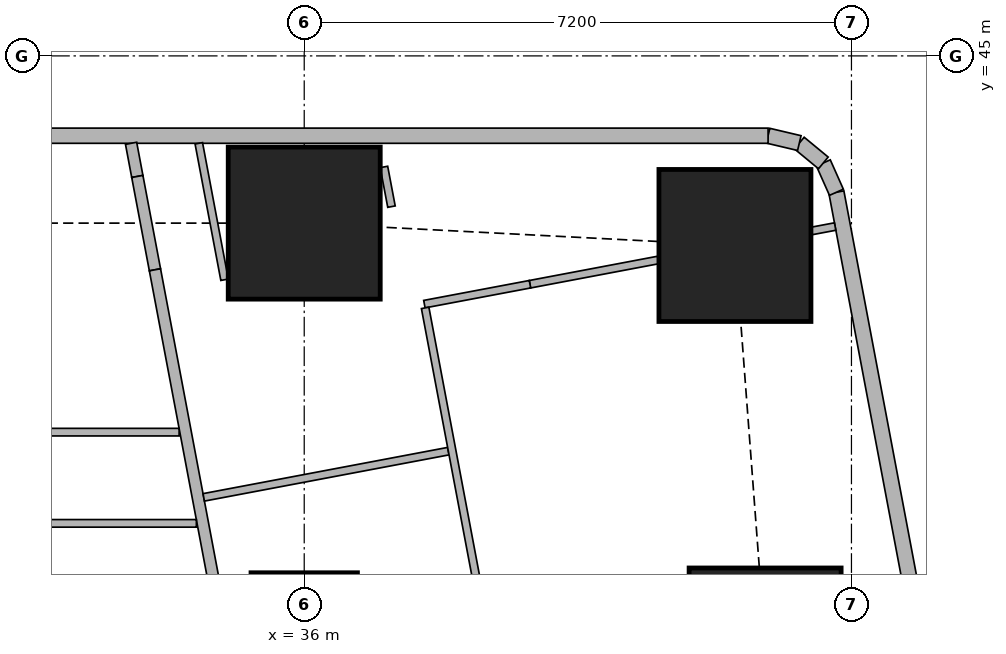
"""IFC4 building model, lengths in metres.
Left out: names, types, materials, properties, quantities, classifications, styles, units other than length and angle.
Written with IfcOpenShell. Run it as: python <this file> out.ifc"""

import sys

from ifc_helpers import new_model, si_unit, direction, frame, frame_2d, origin, origin_2d, place, context, subcontext, project, spatial, rectangle, extrude, element, fill, save


model = new_model("IFC4")
c1 = context("Model", 3, precision=1e-05, world=origin(), true_north=direction((0.0, 1.0)))
c2 = subcontext(c1, "Body", "Model", "MODEL_VIEW")
j1 = project(units=[si_unit("LENGTHUNIT", "METRE"), si_unit("PLANEANGLEUNIT", "RADIAN")], contexts=[c1])
p1 = place(None, origin())
s1 = spatial("IfcSite", under=j1, at=p1, CompositionType="ELEMENT")
p2 = place(p1, origin())
s2 = spatial("IfcBuilding", under=s1, at=p2, CompositionType="ELEMENT")
p3 = place(p2, frame((0.0, 0.0, 285.35)))
s3 = spatial("IfcBuildingStorey", under=s2, at=p3, CompositionType="ELEMENT", Elevation=285.35)
p4 = place(p3, frame((36.0, 37.5, 0.0), z_axis=(0.0, 0.0, 1.0), x_axis=(1.0, 0.0, 0.0)))
e1 = element("IfcColumn", 1, at=p4, inside=s3, PredefinedType="COLUMN", context=c2, shape_type="SweptSolid", body=[
    extrude(rectangle(XDim=1.4, YDim=1.4, at=origin_2d()), origin(), (0.0, 0.0, 1.0), 3.75),
])
for number, where, z_axis, x_axis in (
    (2, (42.064, 37.263, 0.0), (0.0, 0.0, 1.0), (1.0, 0.0, 0.0)),
    (3, (36.0, 42.8, 0.0), (0.0, 0.0, 1.0), (1.0, 0.0, 0.0)),
    (4, (41.667, 42.506, 0.0), (0.0, 0.0, 1.0), (1.0, 0.0, 0.0)),
):
    element("IfcColumn", number, at=place(p3, frame(where, z_axis=z_axis, x_axis=x_axis)), inside=s3, PredefinedType="COLUMN", context=c2, shape_type="SweptSolid", body=[
        extrude(rectangle(XDim=2.0, YDim=2.0, at=origin_2d()), origin(), (0.0, 0.0, 1.0), 3.75),
    ])
p5 = place(p3, frame((49.684, 7.832, 0.0), z_axis=(0.0, 0.0, 1.0), x_axis=(-0.185616669694, 0.982622232565, 0.0)))
e5 = element("IfcWall", 5, at=p5, inside=s3, PredefinedType="SOLIDWALL", context=c2, shape_type="SweptSolid", body=[
    extrude(rectangle(XDim=36.0, YDim=0.2, at=frame_2d((18.0, 0.0))), origin(), (0.0, 0.0, 1.0), 3.5),
])
p6 = place(p5, frame((2.518, 0.0, 0.9)))
e6 = element("IfcOpeningElement", 6, at=p6, cuts=e5, PredefinedType="OPENING", context=c2, shape_type="SweptSolid", body=[
    extrude(rectangle(XDim=2.4, YDim=1.5, at=frame_2d((1.2, 0.75))), frame((0.0, 0.11, 0.0), z_axis=(0.0, -1.0, 0.0), x_axis=(1.0, 0.0, 0.0)), (0.0, 0.0, 1.0), 0.22),
])
p7 = place(p5, frame((8.444, 0.0, 0.9)))
e7 = element("IfcOpeningElement", 7, at=p7, cuts=e5, PredefinedType="OPENING", context=c2, shape_type="SweptSolid", body=[
    extrude(rectangle(XDim=1.8, YDim=1.5, at=frame_2d((0.9, 0.75))), frame((0.0, 0.11, 0.0), z_axis=(0.0, -1.0, 0.0), x_axis=(1.0, 0.0, 0.0)), (0.0, 0.0, 1.0), 0.22),
])
p8 = place(p5, frame((12.261, 0.0, 0.9)))
e8 = element("IfcOpeningElement", 8, at=p8, cuts=e5, PredefinedType="OPENING", context=c2, shape_type="SweptSolid", body=[
    extrude(rectangle(XDim=1.8, YDim=1.5, at=frame_2d((0.9, 0.75))), frame((0.0, 0.11, 0.0), z_axis=(0.0, -1.0, 0.0), x_axis=(1.0, 0.0, 0.0)), (0.0, 0.0, 1.0), 0.22),
])
p9 = place(p5, frame((16.078, 0.0, 0.9)))
e9 = element("IfcOpeningElement", 9, at=p9, cuts=e5, PredefinedType="OPENING", context=c2, shape_type="SweptSolid", body=[
    extrude(rectangle(XDim=1.8, YDim=1.5, at=frame_2d((0.9, 0.75))), frame((0.0, 0.11, 0.0), z_axis=(0.0, -1.0, 0.0), x_axis=(1.0, 0.0, 0.0)), (0.0, 0.0, 1.0), 0.22),
])
p10 = place(p5, frame((19.894, 0.0, 0.9)))
e10 = element("IfcOpeningElement", 10, at=p10, cuts=e5, PredefinedType="OPENING", context=c2, shape_type="SweptSolid", body=[
    extrude(rectangle(XDim=1.8, YDim=1.5, at=frame_2d((0.9, 0.75))), frame((0.0, 0.11, 0.0), z_axis=(0.0, -1.0, 0.0), x_axis=(1.0, 0.0, 0.0)), (0.0, 0.0, 1.0), 0.22),
])
p11 = place(p5, frame((23.71, 0.0, 0.9)))
e11 = element("IfcOpeningElement", 11, at=p11, cuts=e5, PredefinedType="OPENING", context=c2, shape_type="SweptSolid", body=[
    extrude(rectangle(XDim=1.8, YDim=1.5, at=frame_2d((0.9, 0.75))), frame((0.0, 0.11, 0.0), z_axis=(0.0, -1.0, 0.0), x_axis=(1.0, 0.0, 0.0)), (0.0, 0.0, 1.0), 0.22),
])
p12 = place(p5, frame((27.526, 0.0, 0.9)))
e12 = element("IfcOpeningElement", 12, at=p12, cuts=e5, PredefinedType="OPENING", context=c2, shape_type="SweptSolid", body=[
    extrude(rectangle(XDim=1.8, YDim=1.5, at=frame_2d((0.9, 0.75))), frame((0.0, 0.11, 0.0), z_axis=(0.0, -1.0, 0.0), x_axis=(1.0, 0.0, 0.0)), (0.0, 0.0, 1.0), 0.22),
])
p13 = place(p5, frame((32.046, 0.0, 0.9)))
e13 = element("IfcOpeningElement", 13, at=p13, cuts=e5, PredefinedType="OPENING", context=c2, shape_type="SweptSolid", body=[
    extrude(rectangle(XDim=1.8, YDim=1.5, at=frame_2d((0.9, 0.75))), frame((0.0, 0.11, 0.0), z_axis=(0.0, -1.0, 0.0), x_axis=(1.0, 0.0, 0.0)), (0.0, 0.0, 1.0), 0.22),
])
p14 = place(p3, frame((43.002, 43.206, 0.0), z_axis=(0.0, 0.0, 1.0), x_axis=(-0.40678170573, 0.913525393124, 0.0)))
e14 = element("IfcWall", 14, at=p14, inside=s3, PredefinedType="SOLIDWALL", context=c2, shape_type="SweptSolid", body=[
    extrude(rectangle(XDim=0.423, YDim=0.2, at=frame_2d((0.211, 0.0))), origin(), (0.0, 0.0, 1.0), 3.5),
])
p15 = place(p3, frame((42.83, 43.592, 0.0), z_axis=(0.0, 0.0, 1.0), x_axis=(-0.771190539797, 0.636604391539, 0.0)))
e15 = element("IfcWall", 15, at=p15, inside=s3, PredefinedType="SOLIDWALL", context=c2, shape_type="SweptSolid", body=[
    extrude(rectangle(XDim=0.41, YDim=0.2, at=frame_2d((0.205, 0.0))), origin(), (0.0, 0.0, 1.0), 3.5),
])
p16 = place(p3, frame((42.514, 43.853, 0.0), z_axis=(0.0, 0.0, 1.0), x_axis=(-0.973288080424, 0.229587265555, 0.0)))
e16 = element("IfcWall", 16, at=p16, inside=s3, PredefinedType="SOLIDWALL", context=c2, shape_type="SweptSolid", body=[
    extrude(rectangle(XDim=0.422, YDim=0.2, at=frame_2d((0.211, 0.0))), origin(), (0.0, 0.0, 1.0), 3.5),
])
p17 = place(p3, frame((42.103, 43.95, 0.0), z_axis=(0.0, 0.0, 1.0), x_axis=(-1.0, 0.0, 0.0)))
e17 = element("IfcWall", 17, at=p17, inside=s3, PredefinedType="SOLIDWALL", context=c2, shape_type="SweptSolid", body=[
    extrude(rectangle(XDim=27.54, YDim=0.2, at=frame_2d((13.77, 0.0))), origin(), (0.0, 0.0, 1.0), 3.5),
])
p18 = place(p17, frame((10.603, 0.0, 0.9)))
e18 = element("IfcOpeningElement", 18, at=p18, cuts=e17, PredefinedType="OPENING", context=c2, shape_type="SweptSolid", body=[
    extrude(rectangle(XDim=1.8, YDim=1.5, at=frame_2d((0.9, 0.75))), frame((0.0, 0.11, 0.0), z_axis=(0.0, -1.0, 0.0), x_axis=(1.0, 0.0, 0.0)), (0.0, 0.0, 1.0), 0.22),
])
p19 = place(p17, frame((14.203, 0.0, 0.9)))
e19 = element("IfcOpeningElement", 19, at=p19, cuts=e17, PredefinedType="OPENING", context=c2, shape_type="SweptSolid", body=[
    extrude(rectangle(XDim=1.8, YDim=1.5, at=frame_2d((0.9, 0.75))), frame((0.0, 0.11, 0.0), z_axis=(0.0, -1.0, 0.0), x_axis=(1.0, 0.0, 0.0)), (0.0, 0.0, 1.0), 0.22),
])
p20 = place(p17, frame((17.803, 0.0, 0.9)))
e20 = element("IfcOpeningElement", 20, at=p20, cuts=e17, PredefinedType="OPENING", context=c2, shape_type="SweptSolid", body=[
    extrude(rectangle(XDim=1.8, YDim=1.5, at=frame_2d((0.9, 0.75))), frame((0.0, 0.11, 0.0), z_axis=(0.0, -1.0, 0.0), x_axis=(1.0, 0.0, 0.0)), (0.0, 0.0, 1.0), 0.22),
])
p21 = place(p17, frame((21.403, 0.0, 0.9)))
e21 = element("IfcOpeningElement", 21, at=p21, cuts=e17, PredefinedType="OPENING", context=c2, shape_type="SweptSolid", body=[
    extrude(rectangle(XDim=1.8, YDim=1.5, at=frame_2d((0.9, 0.75))), frame((0.0, 0.11, 0.0), z_axis=(0.0, -1.0, 0.0), x_axis=(1.0, 0.0, 0.0)), (0.0, 0.0, 1.0), 0.22),
])
p22 = place(p3, frame((33.722, 43.85, 0.0), z_axis=(0.0, 0.0, 1.0), x_axis=(0.184886516626, -0.982759877066, 0.0)))
e22 = element("IfcWall", 22, at=p22, inside=s3, PredefinedType="SOLIDWALL", context=c2, shape_type="SweptSolid", body=[
    extrude(rectangle(XDim=0.444, YDim=0.15, at=frame_2d((0.222, 0.0))), origin(), (0.0, 0.0, 1.0), 3.5),
])
p23 = place(p3, frame((33.804, 43.414, 0.0), z_axis=(0.0, 0.0, 1.0), x_axis=(0.185585816539, -0.982628060204, 0.0)))
e23 = element("IfcWall", 23, at=p23, inside=s3, PredefinedType="SOLIDWALL", context=c2, shape_type="SweptSolid", body=[
    extrude(rectangle(XDim=1.25, YDim=0.15, at=frame_2d((0.625, 0.0))), origin(), (0.0, 0.0, 1.0), 2.05),
])
p24 = place(p3, frame((34.036, 42.186, 0.0), z_axis=(0.0, 0.0, 1.0), x_axis=(0.185593518645, -0.9826266055, 0.0)))
e24 = element("IfcWall", 24, at=p24, inside=s3, PredefinedType="SOLIDWALL", context=c2, shape_type="SweptSolid", body=[
    extrude(rectangle(XDim=35.961, YDim=0.15, at=frame_2d((17.98, 0.0))), origin(), (0.0, 0.0, 1.0), 2.5),
])
p25 = place(p24, frame((19.345, 0.0, 0.0)))
e25 = element("IfcOpeningElement", 25, at=p25, cuts=e24, PredefinedType="OPENING", context=c2, shape_type="SweptSolid", body=[
    extrude(rectangle(XDim=1.0, YDim=2.1, at=frame_2d((0.5, 1.05))), frame((0.0, 0.085, 0.0), z_axis=(0.0, -1.0, 0.0), x_axis=(1.0, 0.0, 0.0)), (0.0, 0.0, 1.0), 0.17),
])
p26 = place(p24, frame((33.774, 0.0, 0.0)))
e26 = element("IfcOpeningElement", 26, at=p26, cuts=e24, PredefinedType="OPENING", context=c2, shape_type="SweptSolid", body=[
    extrude(rectangle(XDim=1.0, YDim=2.1, at=frame_2d((0.5, 1.05))), frame((0.0, 0.085, 0.0), z_axis=(0.0, -1.0, 0.0), x_axis=(1.0, 0.0, 0.0)), (0.0, 0.0, 1.0), 0.17),
])
p27 = place(p3, frame((34.952, 42.055, 0.0), z_axis=(0.0, 0.0, 1.0), x_axis=(-0.185490642006, 0.98264603074, 0.0)))
e27 = element("IfcWall", 27, at=p27, inside=s3, PredefinedType="PARTITIONING", context=c2, shape_type="SweptSolid", body=[
    extrude(rectangle(XDim=1.827, YDim=0.1, at=frame_2d((0.914, 0.0))), origin(), (0.0, 0.0, 1.0), 2.05),
])
p28 = place(p3, frame((37.049, 43.539, 0.0), z_axis=(0.0, 0.0, 1.0), x_axis=(0.186119495745, -0.982527115811, 0.0)))
e28 = element("IfcWall", 28, at=p28, inside=s3, PredefinedType="PARTITIONING", context=c2, shape_type="SweptSolid", body=[
    extrude(rectangle(XDim=0.531, YDim=0.1, at=frame_2d((0.266, 0.0))), origin(), (0.0, 0.0, 1.0), 2.05),
])
p29 = place(p3, frame((42.985, 42.755, 0.0), z_axis=(0.0, 0.0, 1.0), x_axis=(-0.98281924824, -0.184570651215, 0.0)))
e29 = element("IfcWall", 29, at=p29, inside=s3, PredefinedType="PARTITIONING", context=c2, shape_type="SweptSolid", body=[
    extrude(rectangle(XDim=0.313, YDim=0.1, at=frame_2d((0.157, 0.0))), origin(), (0.0, 0.0, 1.0), 3.5),
])
p30 = place(p3, frame((40.657, 42.315, 0.0), z_axis=(0.0, 0.0, 1.0), x_axis=(-0.982603924403, -0.185713563715, 0.0)))
e30 = element("IfcWall", 30, at=p30, inside=s3, PredefinedType="PARTITIONING", context=c2, shape_type="SweptSolid", body=[
    extrude(rectangle(XDim=1.717, YDim=0.1, at=frame_2d((0.858, 0.0))), origin(), (0.0, 0.0, 1.0), 2.05),
])
p31 = place(p3, frame((38.97, 41.996, 0.0), z_axis=(0.0, 0.0, 1.0), x_axis=(-0.982642648049, -0.185508561084, 0.0)))
e31 = element("IfcWall", 31, at=p31, inside=s3, PredefinedType="PARTITIONING", context=c2, shape_type="SweptSolid", body=[
    extrude(rectangle(XDim=1.413, YDim=0.1, at=frame_2d((0.707, 0.0))), origin(), (0.0, 0.0, 1.0), 3.5),
])
p32 = place(p31, frame((0.363, 0.0, 0.0)))
e32 = element("IfcOpeningElement", 32, at=p32, cuts=e31, PredefinedType="OPENING", context=c2, shape_type="SweptSolid", body=[
    extrude(rectangle(XDim=0.9, YDim=2.1, at=frame_2d((0.45, 1.05))), frame((0.0, 0.06, 0.0), z_axis=(0.0, -1.0, 0.0), x_axis=(1.0, 0.0, 0.0)), (0.0, 0.0, 1.0), 0.12),
])
p33 = place(p3, frame((37.896, 39.8, 0.0), z_axis=(0.0, 0.0, 1.0), x_axis=(-0.982607026909, -0.185697147715, 0.0)))
e33 = element("IfcWall", 33, at=p33, inside=s3, PredefinedType="PARTITIONING", context=c2, shape_type="SweptSolid", body=[
    extrude(rectangle(XDim=3.275, YDim=0.1, at=frame_2d((1.637, 0.0))), origin(), (0.0, 0.0, 1.0), 3.5),
])
p34 = place(p3, frame((37.591, 41.685, 0.0), z_axis=(0.0, 0.0, 1.0), x_axis=(0.185541820726, -0.982636368532, 0.0)))
e34 = element("IfcWall", 34, at=p34, inside=s3, PredefinedType="PARTITIONING", context=c2, shape_type="SweptSolid", body=[
    extrude(rectangle(XDim=16.735, YDim=0.1, at=frame_2d((8.367, 0.0))), origin(), (0.0, 0.0, 1.0), 2.5),
])
p35 = place(p34, frame((2.413, 0.0, 0.0)))
e35 = element("IfcOpeningElement", 35, at=p35, cuts=e34, PredefinedType="OPENING", context=c2, shape_type="SweptSolid", body=[
    extrude(rectangle(XDim=0.9, YDim=2.1, at=frame_2d((0.45, 1.05))), frame((0.0, 0.06, 0.0), z_axis=(0.0, -1.0, 0.0), x_axis=(1.0, 0.0, 0.0)), (0.0, 0.0, 1.0), 0.12),
])
p36 = place(p34, frame((6.713, 0.0, 0.0)))
e36 = element("IfcOpeningElement", 36, at=p36, cuts=e34, PredefinedType="OPENING", context=c2, shape_type="SweptSolid", body=[
    extrude(rectangle(XDim=0.9, YDim=2.1, at=frame_2d((0.45, 1.05))), frame((0.0, 0.06, 0.0), z_axis=(0.0, -1.0, 0.0), x_axis=(1.0, 0.0, 0.0)), (0.0, 0.0, 1.0), 0.12),
])
p37 = place(p34, frame((9.805, 0.0, 0.0)))
e37 = element("IfcOpeningElement", 37, at=p37, cuts=e34, PredefinedType="OPENING", context=c2, shape_type="SweptSolid", body=[
    extrude(rectangle(XDim=0.9, YDim=2.1, at=frame_2d((0.45, 1.05))), frame((0.0, 0.06, 0.0), z_axis=(0.0, -1.0, 0.0), x_axis=(1.0, 0.0, 0.0)), (0.0, 0.0, 1.0), 0.12),
])
p38 = place(p34, frame((11.713, 0.0, 0.0)))
e38 = element("IfcOpeningElement", 38, at=p38, cuts=e34, PredefinedType="OPENING", context=c2, shape_type="SweptSolid", body=[
    extrude(rectangle(XDim=0.9, YDim=2.1, at=frame_2d((0.45, 1.05))), frame((0.0, 0.06, 0.0), z_axis=(0.0, -1.0, 0.0), x_axis=(1.0, 0.0, 0.0)), (0.0, 0.0, 1.0), 0.12),
])
p39 = place(p34, frame((14.426, 0.0, 0.0)))
e39 = element("IfcOpeningElement", 39, at=p39, cuts=e34, PredefinedType="OPENING", context=c2, shape_type="SweptSolid", body=[
    extrude(rectangle(XDim=0.9, YDim=2.1, at=frame_2d((0.45, 1.05))), frame((0.0, 0.06, 0.0), z_axis=(0.0, -1.0, 0.0), x_axis=(1.0, 0.0, 0.0)), (0.0, 0.0, 1.0), 0.12),
])
p40 = place(p3, frame((28.8, 38.85, 0.0), z_axis=(0.0, 0.0, 1.0), x_axis=(1.0, 0.0, 0.0)))
e40 = element("IfcWall", 40, at=p40, inside=s3, PredefinedType="PARTITIONING", context=c2, shape_type="SweptSolid", body=[
    extrude(rectangle(XDim=5.781, YDim=0.1, at=frame_2d((2.891, 0.0))), origin(), (0.0, 0.0, 1.0), 3.5),
])
p41 = place(p40, frame((0.75, 0.0, 0.0)))
e41 = element("IfcOpeningElement", 41, at=p41, cuts=e40, PredefinedType="OPENING", context=c2, shape_type="SweptSolid", body=[
    extrude(rectangle(XDim=0.9, YDim=2.1, at=frame_2d((0.45, 1.05))), frame((0.0, 0.06, 0.0), z_axis=(0.0, -1.0, 0.0), x_axis=(1.0, 0.0, 0.0)), (0.0, 0.0, 1.0), 0.12),
])
p42 = place(p40, frame((2.5, 0.0, 0.0)))
e42 = element("IfcOpeningElement", 42, at=p42, cuts=e40, PredefinedType="OPENING", context=c2, shape_type="SweptSolid", body=[
    extrude(rectangle(XDim=0.9, YDim=2.1, at=frame_2d((0.45, 1.05))), frame((0.0, 0.06, 0.0), z_axis=(0.0, -1.0, 0.0), x_axis=(1.0, 0.0, 0.0)), (0.0, 0.0, 1.0), 0.12),
])
p43 = place(p40, frame((3.85, 0.0, 0.0)))
e43 = element("IfcOpeningElement", 43, at=p43, cuts=e40, PredefinedType="OPENING", context=c2, shape_type="SweptSolid", body=[
    extrude(rectangle(XDim=0.9, YDim=2.1, at=frame_2d((0.45, 1.05))), frame((0.0, 0.06, 0.0), z_axis=(0.0, -1.0, 0.0), x_axis=(1.0, 0.0, 0.0)), (0.0, 0.0, 1.0), 0.12),
])
p44 = place(p3, frame((28.8, 40.05, 0.0), z_axis=(0.0, 0.0, 1.0), x_axis=(1.0, 0.0, 0.0)))
e44 = element("IfcWall", 44, at=p44, inside=s3, PredefinedType="PARTITIONING", context=c2, shape_type="SweptSolid", body=[
    extrude(rectangle(XDim=5.554, YDim=0.1, at=frame_2d((2.777, 0.0))), origin(), (0.0, 0.0, 1.0), 3.5),
])
p45 = place(p44, frame((0.3, 0.0, 0.0)))
e45 = element("IfcOpeningElement", 45, at=p45, cuts=e44, PredefinedType="OPENING", context=c2, shape_type="SweptSolid", body=[
    extrude(rectangle(XDim=0.9, YDim=2.1, at=frame_2d((0.45, 1.05))), frame((0.0, 0.06, 0.0), z_axis=(0.0, -1.0, 0.0), x_axis=(1.0, 0.0, 0.0)), (0.0, 0.0, 1.0), 0.12),
])
p46 = place(p13, origin())
e46 = element("IfcWindow", 46, at=p46, inside=s3, PartitioningType="SINGLE_PANEL", PredefinedType="WINDOW", context=c2, shape_type="SweptSolid", body=[
    extrude(rectangle(XDim=1.8, YDim=1.5, at=frame_2d((0.9, 0.75))), frame((0.0, 0.03, 0.0), z_axis=(0.0, -1.0, 0.0), x_axis=(1.0, 0.0, 0.0)), (0.0, 0.0, 1.0), 0.06),
])
fill(e13, e46)
p47 = place(p32, origin())
e47 = element("IfcDoor", 47, at=p47, inside=s3, OperationType="SINGLE_SWING_LEFT", PredefinedType="DOOR", context=c2, shape_type="SweptSolid", body=[
    extrude(rectangle(XDim=0.9, YDim=2.1, at=frame_2d((0.45, 1.05))), frame((0.0, 0.025, 0.0), z_axis=(0.0, -1.0, 0.0), x_axis=(1.0, 0.0, 0.0)), (0.0, 0.0, 1.0), 0.05),
])
fill(e32, e47)
p48 = place(p35, origin())
e48 = element("IfcDoor", 48, at=p48, inside=s3, OperationType="SINGLE_SWING_LEFT", PredefinedType="DOOR", context=c2, shape_type="SweptSolid", body=[
    extrude(rectangle(XDim=0.9, YDim=2.1, at=frame_2d((0.45, 1.05))), frame((0.0, 0.025, 0.0), z_axis=(0.0, -1.0, 0.0), x_axis=(1.0, 0.0, 0.0)), (0.0, 0.0, 1.0), 0.05),
])
fill(e35, e48)
p49 = place(p43, origin())
e49 = element("IfcDoor", 49, at=p49, inside=s3, OperationType="SINGLE_SWING_RIGHT", PredefinedType="DOOR", context=c2, shape_type="SweptSolid", body=[
    extrude(rectangle(XDim=0.9, YDim=2.1, at=frame_2d((0.45, 1.05))), frame((0.0, 0.025, 0.0), z_axis=(0.0, -1.0, 0.0), x_axis=(1.0, 0.0, 0.0)), (0.0, 0.0, 1.0), 0.05),
])
fill(e43, e49)
save(model, sys.argv[1])
